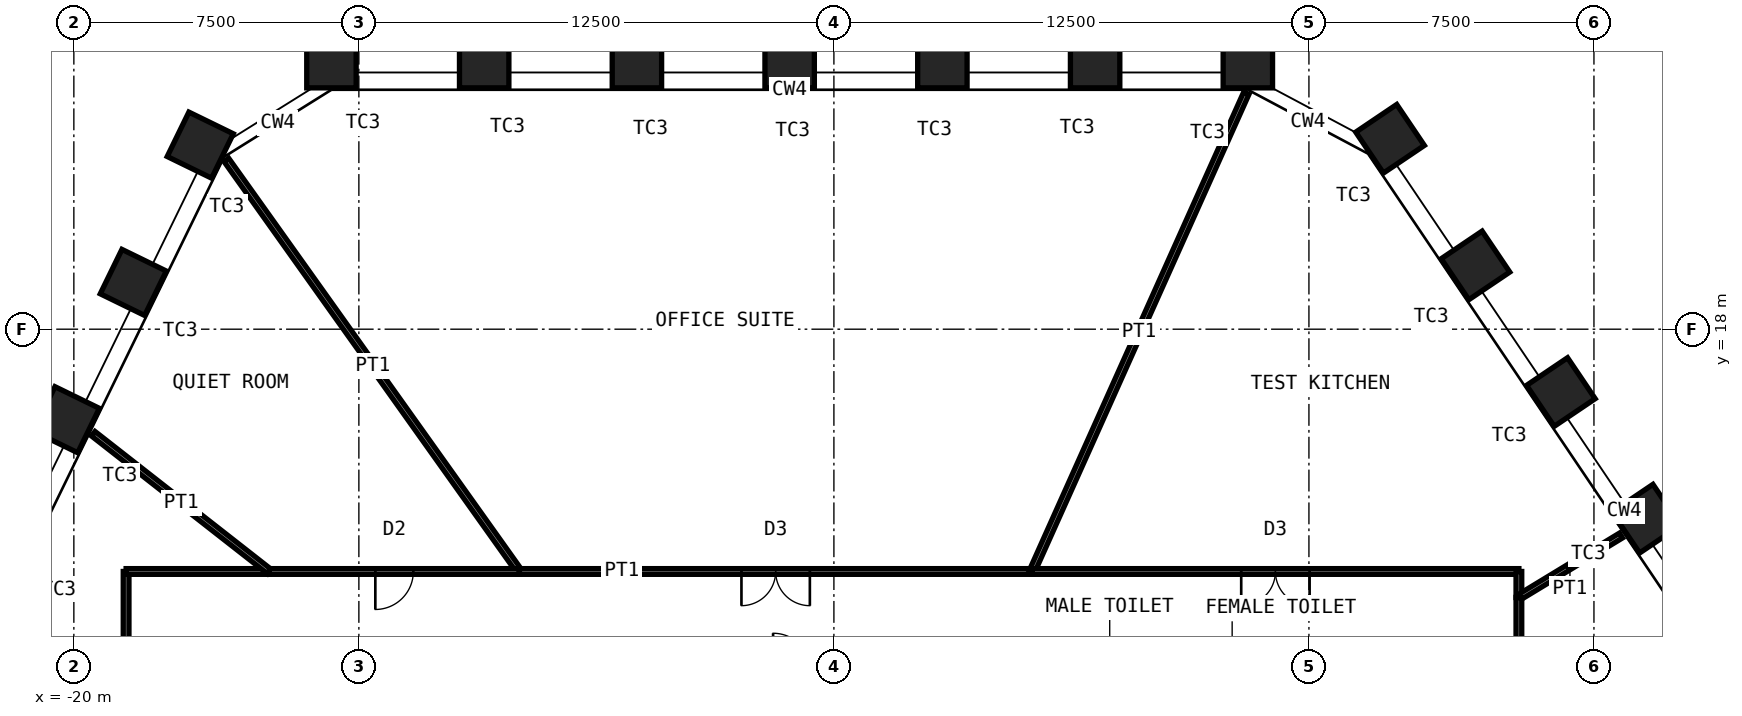
"""IFC4 building model, lengths in metres.
Left out: names, types, materials, properties, quantities, classifications, styles, units other than length and angle.
Written with IfcOpenShell. Run it as: python <this file> out.ifc"""

import sys

from ifc_helpers import new_model, si_unit, direction, frame, frame_2d, origin, origin_2d, place, context, subcontext, project, spatial, rectangle, hollow_rectangle, extrude, element, fill, save


model = new_model("IFC4")
c1 = context("Model", 3, precision=1e-05, world=origin(), true_north=direction((0.0, 1.0)))
c2 = subcontext(c1, "Body", "Model", "MODEL_VIEW")
j1 = project(units=[si_unit("LENGTHUNIT", "METRE"), si_unit("PLANEANGLEUNIT", "RADIAN")], contexts=[c1])
p1 = place(None, origin())
s1 = spatial("IfcSite", under=j1, at=p1, CompositionType="ELEMENT")
p2 = place(p1, origin())
s2 = spatial("IfcBuilding", under=s1, at=p2, CompositionType="ELEMENT")
p3 = place(p2, frame((0.0, 0.0, 115.6)))
s3 = spatial("IfcBuildingStorey", under=s2, at=p3, CompositionType="ELEMENT", Elevation=115.6)
for number, where, z_axis, x_axis in (
    (1, (-13.222, 25.0, 0.0), (0.0, 0.0, 1.0), (-1.0, 0.0, 0.0)),
    (2, (-9.203, 25.0, 0.0), (0.0, 0.0, 1.0), (-1.0, 0.0, 0.0)),
    (3, (-5.184, 25.0, 0.0), (0.0, 0.0, 1.0), (-1.0, 0.0, 0.0)),
    (4, (-1.165, 25.0, 0.0), (0.0, 0.0, 1.0), (-1.0, 0.0, 0.0)),
    (5, (2.854, 25.0, 0.0), (0.0, 0.0, 1.0), (-1.0, 0.0, 0.0)),
    (6, (6.874, 25.0, 0.0), (0.0, 0.0, 1.0), (-1.0, 0.0, 0.0)),
    (7, (10.893, 25.0, 0.0), (0.0, 0.0, 1.0), (-1.0, 0.0, 0.0)),
    (8, (14.635, 23.01, 0.0), (0.0, 0.0, 1.0), (-0.559, 0.829, 0.0)),
    (9, (16.882, 19.678, 0.0), (0.0, 0.0, 1.0), (-0.559, 0.829, 0.0)),
    (10, (19.13, 16.346, 0.0), (0.0, 0.0, 1.0), (-0.559, 0.829, 0.0)),
    (11, (21.377, 13.014, 0.0), (0.0, 0.0, 1.0), (-0.559, 0.829, 0.0)),
    (12, (-20.198, 15.618, 0.0), (0.0, 0.0, 1.0), (-0.438, -0.899, 0.0)),
    (13, (-18.436, 19.23, 0.0), (0.0, 0.0, 1.0), (-0.438, -0.899, 0.0)),
    (14, (-16.674, 22.843, 0.0), (0.0, 0.0, 1.0), (-0.438, -0.899, 0.0)),
):
    element("IfcColumn", number, at=place(p3, frame(where, z_axis=z_axis, x_axis=x_axis)), inside=s3, PredefinedType="COLUMN", context=c2, shape_type="SweptSolid", body=[
        extrude(hollow_rectangle(XDim=1.3, YDim=1.3, WallThickness=0.1, at=origin_2d()), origin(), (0.0, 0.0, 1.0), 4.2),
    ])
p4 = place(p3, frame((-15.987, 22.455, 0.0), z_axis=(0.0, 0.0, 1.0), x_axis=(0.579969304452, -0.814638328274, 0.0)))
e15 = element("IfcWall", 15, at=p4, inside=s3, PredefinedType="PARTITIONING", context=c2, shape_type="SweptSolid", body=[
    extrude(rectangle(XDim=13.294, YDim=0.15, at=frame_2d((6.647, 0.0))), origin(), (0.0, 0.0, 1.0), 2.93),
])
p5 = place(p3, frame((-8.277, 11.625, 0.0), z_axis=(0.0, 0.0, 1.0), x_axis=(1.0, 0.0, 0.0)))
e16 = element("IfcWall", 16, at=p5, inside=s3, PredefinedType="PARTITIONING", context=c2, shape_type="SweptSolid", body=[
    extrude(rectangle(XDim=13.488, YDim=0.15, at=frame_2d((6.744, 0.0))), origin(), (0.0, 0.0, 1.0), 4.03),
])
p6 = place(p5, frame((5.844, 0.0, 0.0)))
e17 = element("IfcOpeningElement", 17, at=p6, cuts=e16, PredefinedType="OPENING", context=c2, shape_type="SweptSolid", body=[
    extrude(rectangle(XDim=1.8, YDim=2.4, at=frame_2d((0.9, 1.2))), frame((0.0, 0.085, 0.0), z_axis=(0.0, -1.0, 0.0), x_axis=(1.0, 0.0, 0.0)), (0.0, 0.0, 1.0), 0.17),
])
p7 = place(p3, frame((10.852, 24.209, 0.0), z_axis=(0.0, 0.0, 1.0), x_axis=(-0.40904878746, -0.912512514696, 0.0)))
e18 = element("IfcWall", 18, at=p7, inside=s3, PredefinedType="PARTITIONING", context=c2, shape_type="SweptSolid", body=[
    extrude(rectangle(XDim=13.79, YDim=0.15, at=frame_2d((6.895, 0.0))), origin(), (0.0, 0.0, 1.0), 2.93),
])
p8 = place(p3, frame((5.211, 11.625, 0.0), z_axis=(0.0, 0.0, 1.0), x_axis=(1.0, 0.0, 0.0)))
e19 = element("IfcWall", 19, at=p8, inside=s3, PredefinedType="PARTITIONING", context=c2, shape_type="SweptSolid", body=[
    extrude(rectangle(XDim=12.814, YDim=0.15, at=frame_2d((6.407, 0.0))), origin(), (0.0, 0.0, 1.0), 4.03),
])
p9 = place(p8, frame((5.507, 0.0, 0.0)))
e20 = element("IfcOpeningElement", 20, at=p9, cuts=e19, PredefinedType="OPENING", context=c2, shape_type="SweptSolid", body=[
    extrude(rectangle(XDim=1.8, YDim=2.4, at=frame_2d((0.9, 1.2))), frame((0.0, 0.085, 0.0), z_axis=(0.0, -1.0, 0.0), x_axis=(1.0, 0.0, 0.0)), (0.0, 0.0, 1.0), 0.17),
])
p10 = place(p3, frame((18.025, 11.625, 0.0), z_axis=(0.0, 0.0, 1.0), x_axis=(0.0, -1.0, 0.0)))
e21 = element("IfcWall", 21, at=p10, inside=s3, PredefinedType="PARTITIONING", context=c2, shape_type="SweptSolid", body=[
    extrude(rectangle(XDim=0.684, YDim=0.15, at=frame_2d((0.342, 0.0))), origin(), (0.0, 0.0, 1.0), 4.03),
])
p11 = place(p3, frame((20.711, 12.571, 0.0), z_axis=(0.0, 0.0, 1.0), x_axis=(-0.854890890653, -0.518807830587, 0.0)))
e22 = element("IfcWall", 22, at=p11, inside=s3, PredefinedType="PARTITIONING", context=c2, shape_type="SweptSolid", body=[
    extrude(rectangle(XDim=3.143, YDim=0.15, at=frame_2d((1.571, 0.0))), origin(), (0.0, 0.0, 1.0), 3.33),
])
p12 = place(p3, frame((18.025, 10.941, 0.0), z_axis=(0.0, 0.0, 1.0), x_axis=(0.0, -1.0, 0.0)))
e23 = element("IfcWall", 23, at=p12, inside=s3, PredefinedType="PARTITIONING", context=c2, shape_type="SweptSolid", body=[
    extrude(rectangle(XDim=9.221, YDim=0.15, at=frame_2d((4.611, 0.0))), origin(), (0.0, 0.0, 1.0), 4.03),
])
p13 = place(p12, frame((3.71, 0.0, 0.0)))
e24 = element("IfcOpeningElement", 24, at=p13, cuts=e23, PredefinedType="OPENING", context=c2, shape_type="SweptSolid", body=[
    extrude(rectangle(XDim=1.8, YDim=2.4, at=frame_2d((0.9, 1.2))), frame((0.0, 0.085, 0.0), z_axis=(0.0, -1.0, 0.0), x_axis=(1.0, 0.0, 0.0)), (0.0, 0.0, 1.0), 0.17),
])
p14 = place(p3, frame((-18.625, -1.91, 0.0), z_axis=(0.0, 0.0, 1.0), x_axis=(0.0, 1.0, 0.0)))
e25 = element("IfcWall", 25, at=p14, inside=s3, PredefinedType="PARTITIONING", context=c2, shape_type="SweptSolid", body=[
    extrude(rectangle(XDim=13.535, YDim=0.15, at=frame_2d((6.768, 0.0))), origin(), (0.0, 0.0, 1.0), 4.03),
])
p15 = place(p14, frame((5.867, 0.0, 0.0)))
e26 = element("IfcOpeningElement", 26, at=p15, cuts=e25, PredefinedType="OPENING", context=c2, shape_type="SweptSolid", body=[
    extrude(rectangle(XDim=1.8, YDim=2.4, at=frame_2d((0.9, 1.2))), frame((0.0, 0.085, 0.0), z_axis=(0.0, -1.0, 0.0), x_axis=(1.0, 0.0, 0.0)), (0.0, 0.0, 1.0), 0.17),
])
p16 = place(p3, frame((-18.625, 11.625, 0.0), z_axis=(0.0, 0.0, 1.0), x_axis=(1.0, 0.0, 0.0)))
e27 = element("IfcWall", 27, at=p16, inside=s3, PredefinedType="PARTITIONING", context=c2, shape_type="SweptSolid", body=[
    extrude(rectangle(XDim=3.768, YDim=0.15, at=frame_2d((1.884, 0.0))), origin(), (0.0, 0.0, 1.0), 4.03),
])
p17 = place(p3, frame((-19.49, 15.25, 0.0), z_axis=(0.0, 0.0, 1.0), x_axis=(0.787549668605, -0.616251182133, 0.0)))
e28 = element("IfcWall", 28, at=p17, inside=s3, PredefinedType="PARTITIONING", context=c2, shape_type="SweptSolid", body=[
    extrude(rectangle(XDim=5.882, YDim=0.15, at=frame_2d((2.941, 0.0))), origin(), (0.0, 0.0, 1.0), 3.33),
])
p18 = place(p3, frame((-14.857, 11.625, 0.0), z_axis=(0.0, 0.0, 1.0), x_axis=(1.0, 0.0, 0.0)))
e29 = element("IfcWall", 29, at=p18, inside=s3, PredefinedType="PARTITIONING", context=c2, shape_type="SweptSolid", body=[
    extrude(rectangle(XDim=6.581, YDim=0.15, at=frame_2d((3.29, 0.0))), origin(), (0.0, 0.0, 1.0), 4.03),
])
p19 = place(p18, frame((2.79, 0.0, 0.0)))
e30 = element("IfcOpeningElement", 30, at=p19, cuts=e29, PredefinedType="OPENING", context=c2, shape_type="SweptSolid", body=[
    extrude(rectangle(XDim=1.0, YDim=2.4, at=frame_2d((0.5, 1.2))), frame((0.0, 0.085, 0.0), z_axis=(0.0, -1.0, 0.0), x_axis=(1.0, 0.0, 0.0)), (0.0, 0.0, 1.0), 0.17),
])
p20 = place(p6, origin())
e31 = element("IfcDoor", 31, at=p20, inside=s3, OperationType="DOUBLE_DOOR_DOUBLE_SWING", PredefinedType="DOOR", context=c2, shape_type="SweptSolid", body=[
    extrude(rectangle(XDim=1.8, YDim=2.4, at=frame_2d((0.9, 1.2))), frame((0.0, 0.025, 0.0), z_axis=(0.0, -1.0, 0.0), x_axis=(1.0, 0.0, 0.0)), (0.0, 0.0, 1.0), 0.05),
])
fill(e17, e31)
p21 = place(p9, origin())
e32 = element("IfcDoor", 32, at=p21, inside=s3, OperationType="DOUBLE_DOOR_DOUBLE_SWING", PredefinedType="DOOR", context=c2, shape_type="SweptSolid", body=[
    extrude(rectangle(XDim=1.8, YDim=2.4, at=frame_2d((0.9, 1.2))), frame((0.0, 0.025, 0.0), z_axis=(0.0, -1.0, 0.0), x_axis=(1.0, 0.0, 0.0)), (0.0, 0.0, 1.0), 0.05),
])
fill(e20, e32)
p22 = place(p19, origin())
e33 = element("IfcDoor", 33, at=p22, inside=s3, OperationType="SINGLE_SWING_LEFT", PredefinedType="DOOR", context=c2, shape_type="SweptSolid", body=[
    extrude(rectangle(XDim=1.0, YDim=2.4, at=frame_2d((0.5, 1.2))), frame((0.0, 0.025, 0.0), z_axis=(0.0, -1.0, 0.0), x_axis=(1.0, 0.0, 0.0)), (0.0, 0.0, 1.0), 0.05),
])
fill(e30, e33)
save(model, sys.argv[1])
